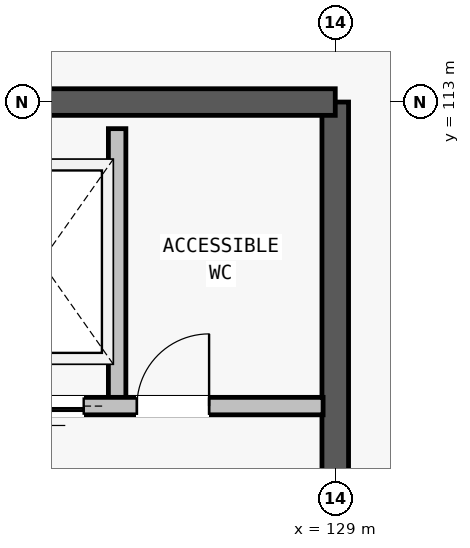
"""IFC4 building model, lengths in metres.
Left out: names, types, materials, properties, quantities, classifications, styles, units other than length and angle.
Written with IfcOpenShell. Run it as: python <this file> out.ifc"""

import sys

from ifc_helpers import new_model, si_unit, direction, frame, frame_2d, origin, place, context, subcontext, project, spatial, rectangle, extrude, element, fill, save


model = new_model("IFC4")
c1 = context("Model", 3, precision=1e-05, world=origin(), true_north=direction((0.0, 1.0)))
c2 = subcontext(c1, "Body", "Model", "MODEL_VIEW")
j1 = project(units=[si_unit("LENGTHUNIT", "METRE"), si_unit("PLANEANGLEUNIT", "RADIAN")], contexts=[c1])
p1 = place(None, origin())
s1 = spatial("IfcSite", under=j1, at=p1, CompositionType="ELEMENT")
p2 = place(p1, origin())
s2 = spatial("IfcBuilding", under=s1, at=p2, CompositionType="ELEMENT")
p3 = place(p2, frame((0.0, 0.0, 21.2)))
s3 = spatial("IfcBuildingStorey", under=s2, at=p3, CompositionType="ELEMENT", Elevation=21.2)
p4 = place(p3, frame((129.0, 104.0, 0.0), z_axis=(0.0, 0.0, 1.0), x_axis=(0.0, 1.0, 0.0)))
e1 = element("IfcWall", 1, at=p4, inside=s3, PredefinedType="SHEAR", context=c2, shape_type="SweptSolid", body=[
    extrude(rectangle(XDim=9.0, YDim=0.35, at=frame_2d((4.5, 0.0))), origin(), (0.0, 0.0, 1.0), 3.62),
])
p5 = place(p4, frame((1.4, 0.0, 0.0)))
e2 = element("IfcOpeningElement", 2, at=p5, cuts=e1, PredefinedType="OPENING", context=c2, shape_type="SweptSolid", body=[
    extrude(rectangle(XDim=1.9, YDim=2.3, at=frame_2d((0.95, 1.15))), frame((0.0, 0.185, 0.0), z_axis=(0.0, -1.0, 0.0), x_axis=(1.0, 0.0, 0.0)), (0.0, 0.0, 1.0), 0.37),
])
p6 = place(p3, frame((129.0, 113.0, 0.0), z_axis=(0.0, 0.0, 1.0), x_axis=(-1.0, 0.0, 0.0)))
e3 = element("IfcWall", 3, at=p6, inside=s3, PredefinedType="SHEAR", context=c2, shape_type="SweptSolid", body=[
    extrude(rectangle(XDim=9.0, YDim=0.35, at=frame_2d((4.5, 0.0))), origin(), (0.0, 0.0, 1.0), 3.62),
])
p7 = place(p3, frame((126.13, 109.0, 0.0), z_axis=(0.0, 0.0, 1.0), x_axis=(0.0, 1.0, 0.0)))
e4 = element("IfcWall", 4, at=p7, inside=s3, PredefinedType="PARTITIONING", context=c2, shape_type="SweptSolid", body=[
    extrude(rectangle(XDim=3.65, YDim=0.23, at=frame_2d((1.825, 0.0))), origin(), (0.0, 0.0, 1.0), 2.48),
])
p8 = place(p3, frame((124.21, 109.0, 0.0), z_axis=(0.0, 0.0, 1.0), x_axis=(1.0, 0.0, 0.0)))
e5 = element("IfcWall", 5, at=p8, inside=s3, PredefinedType="PARTITIONING", context=c2, shape_type="SweptSolid", body=[
    extrude(rectangle(XDim=4.63, YDim=0.23, at=frame_2d((2.315, 0.0))), origin(), (0.0, 0.0, 1.0), 2.48),
])
p9 = place(p8, frame((0.38, 0.0, 0.0)))
e6 = element("IfcOpeningElement", 6, at=p9, cuts=e5, PredefinedType="OPENING", context=c2, shape_type="SweptSolid", body=[
    extrude(rectangle(XDim=1.1, YDim=2.15, at=frame_2d((0.55, 1.075))), frame((0.0, 0.125, 0.0), z_axis=(0.0, -1.0, 0.0), x_axis=(1.0, 0.0, 0.0)), (0.0, 0.0, 1.0), 0.25),
])
p10 = place(p8, frame((2.18, 0.0, 0.0)))
e7 = element("IfcOpeningElement", 7, at=p10, cuts=e5, PredefinedType="OPENING", context=c2, shape_type="SweptSolid", body=[
    extrude(rectangle(XDim=0.95, YDim=2.1, at=frame_2d((0.475, 1.05))), frame((0.0, 0.125, 0.0), z_axis=(0.0, -1.0, 0.0), x_axis=(1.0, 0.0, 0.0)), (0.0, 0.0, 1.0), 0.25),
])
p11 = place(p9, origin())
e8 = element("IfcDoor", 8, at=p11, inside=s3, OperationType="SLIDING_TO_LEFT", PredefinedType="DOOR", context=c2, shape_type="SweptSolid", body=[
    extrude(rectangle(XDim=1.1, YDim=2.15, at=frame_2d((0.55, 1.075))), frame((0.0, 0.025, 0.0), z_axis=(0.0, -1.0, 0.0), x_axis=(1.0, 0.0, 0.0)), (0.0, 0.0, 1.0), 0.05),
])
fill(e6, e8)
p12 = place(p10, origin())
e9 = element("IfcDoor", 9, at=p12, inside=s3, OperationType="SINGLE_SWING_RIGHT", PredefinedType="DOOR", context=c2, shape_type="SweptSolid", body=[
    extrude(rectangle(XDim=0.95, YDim=2.1, at=frame_2d((0.475, 1.05))), frame((0.0, 0.025, 0.0), z_axis=(0.0, -1.0, 0.0), x_axis=(1.0, 0.0, 0.0)), (0.0, 0.0, 1.0), 0.05),
])
fill(e7, e9)
save(model, sys.argv[1])
